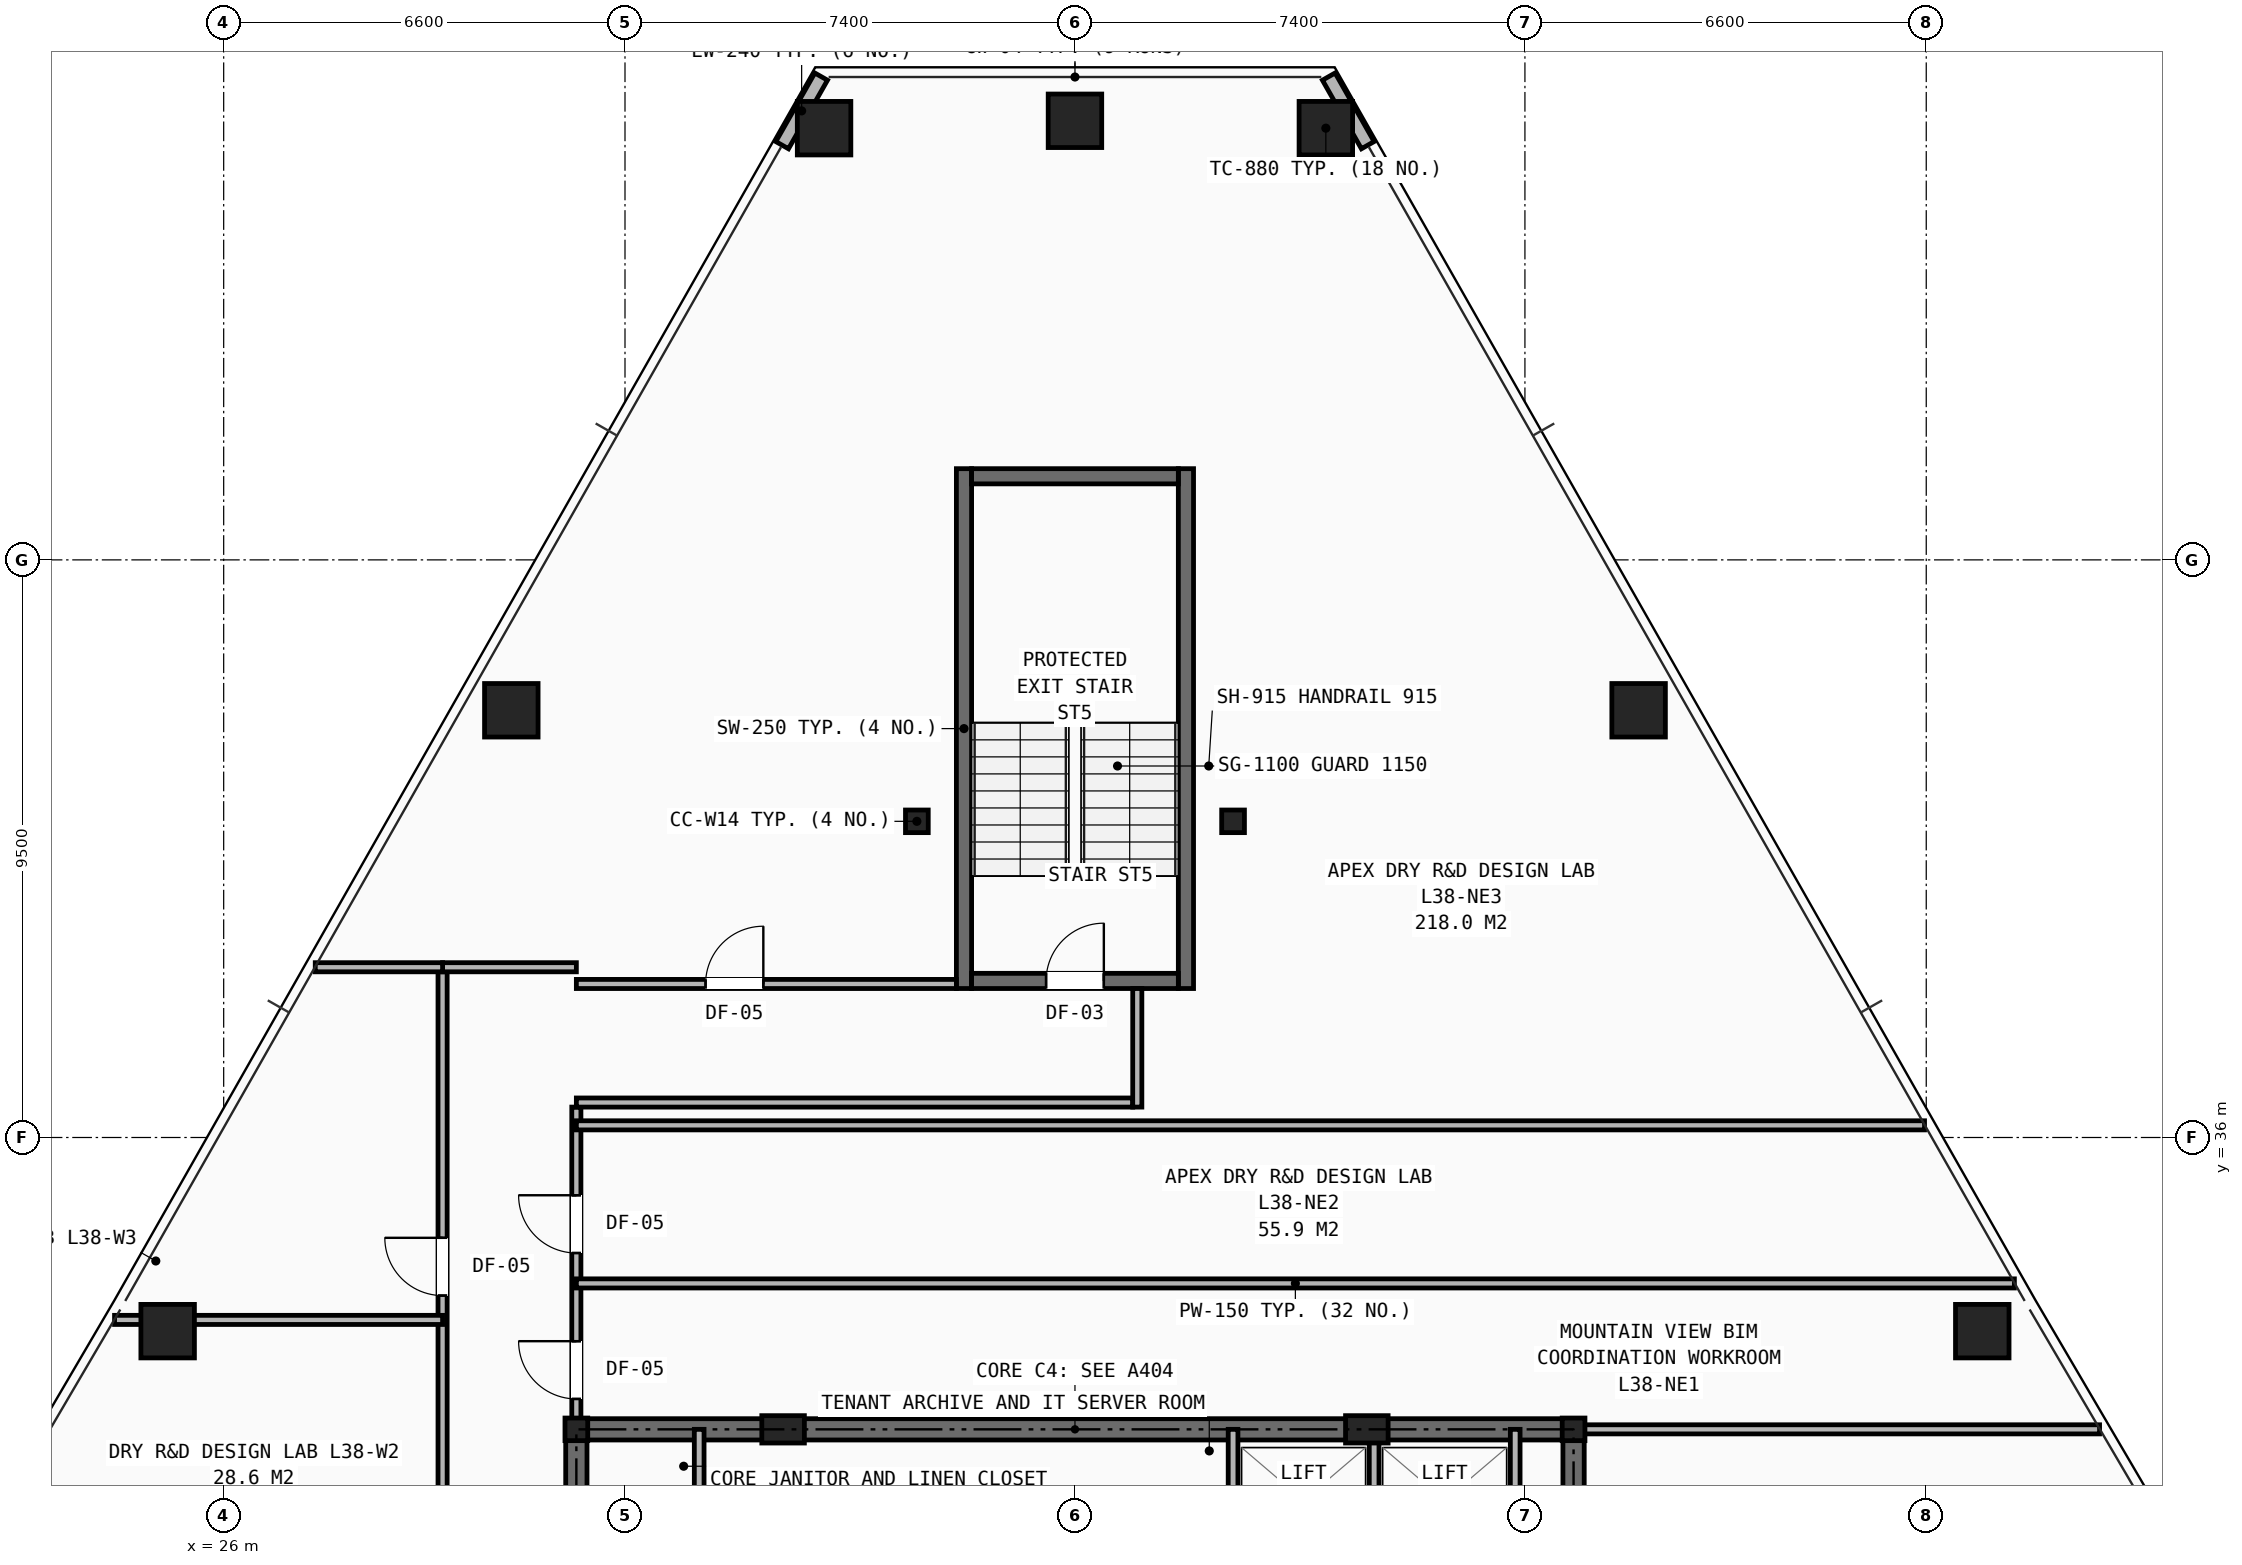
"""IFC4 building model, lengths in metres.
Left out: names, types, materials, properties, quantities, classifications, styles, units other than length and angle.
Written with IfcOpenShell. Run it as: python <this file> out.ifc"""

import sys

from ifc_helpers import new_model, si_unit, direction, frame, frame_2d, origin, origin_2d, place, context, subcontext, project, spatial, rectangle, hollow_rectangle, i_section, extrude, element, fill, save


model = new_model("IFC4")
c1 = context("Model", 3, precision=1e-05, world=origin(), true_north=direction((0.0, 1.0)))
c2 = subcontext(c1, "Body", "Model", "MODEL_VIEW")
j1 = project(units=[si_unit("LENGTHUNIT", "METRE"), si_unit("PLANEANGLEUNIT", "RADIAN")], contexts=[c1])
p1 = place(None, origin())
s1 = spatial("IfcSite", under=j1, at=p1, CompositionType="ELEMENT")
p2 = place(p1, origin())
s2 = spatial("IfcBuilding", under=s1, at=p2, CompositionType="ELEMENT")
p3 = place(p2, frame((0.0, 0.0, 133.25)))
s3 = spatial("IfcBuildingStorey", under=s2, at=p3, CompositionType="ELEMENT", Elevation=133.25)
for number, where, z_axis, x_axis in (
    (1, (31.8, 31.2, 0.0), (0.0, 0.0, 1.0), (1.0, 0.0, 0.0)),
    (2, (48.2, 31.2, 0.0), (0.0, 0.0, 1.0), (1.0, 0.0, 0.0)),
    (3, (37.4, 41.2, 0.0), (0.0, 0.0, 1.0), (1.0, 0.0, 0.0)),
    (4, (42.6, 41.2, 0.0), (0.0, 0.0, 1.0), (1.0, 0.0, 0.0)),
):
    element("IfcColumn", number, at=place(p3, frame(where, z_axis=z_axis, x_axis=x_axis)), inside=s3, PredefinedType="COLUMN", context=c2, shape_type="SweptSolid", body=[
        extrude(i_section(OverallWidth=0.374, OverallDepth=0.372, WebThickness=0.016, FlangeThickness=0.026, at=origin_2d()), origin(), (0.0, 0.0, 1.0), 3.45),
    ])
for number, where, z_axis, x_axis in (
    (5, (35.2, 31.2, 0.0), (0.0, 0.0, 1.0), (1.0, 0.0, 0.0)),
    (6, (44.8, 31.2, 0.0), (0.0, 0.0, 1.0), (1.0, 0.0, 0.0)),
):
    element("IfcColumn", number, at=place(p3, frame(where, z_axis=z_axis, x_axis=x_axis)), inside=s3, PredefinedType="PILASTER", context=c2, shape_type="SweptSolid", body=[
        extrude(rectangle(XDim=0.7, YDim=0.45, at=origin_2d()), origin(), (0.0, 0.0, 1.0), 3.45),
    ])
for number, where, z_axis, x_axis in (
    (7, (44.126, 52.6, 0.0), (0.0, 0.0, 1.0), (1.0, 0.0, 0.0)),
    (8, (40.0, 52.722, 0.0), (0.0, 0.0, 1.0), (1.0, 0.0, 0.0)),
    (9, (35.874, 52.6, 0.0), (0.0, 0.0, 1.0), (1.0, 0.0, 0.0)),
    (10, (30.73, 43.026, 0.0), (0.0, 0.0, 1.0), (1.0, 0.0, 0.0)),
    (11, (25.079, 32.815, 0.0), (0.0, 0.0, 1.0), (1.0, 0.0, 0.0)),
    (12, (54.921, 32.815, 0.0), (0.0, 0.0, 1.0), (1.0, 0.0, 0.0)),
    (13, (49.27, 43.026, 0.0), (0.0, 0.0, 1.0), (1.0, 0.0, 0.0)),
):
    element("IfcColumn", number, at=place(p3, frame(where, z_axis=z_axis, x_axis=x_axis)), inside=s3, PredefinedType="COLUMN", context=c2, shape_type="SweptSolid", body=[
        extrude(hollow_rectangle(XDim=0.88, YDim=0.88, WallThickness=0.06, at=origin_2d()), origin(), (0.0, 0.0, 1.0), 3.45),
    ])
for number, where, z_axis, x_axis in (
    (14, (35.826, 53.449, 0.0), (0.0, 0.0, 1.0), (-0.494, -0.869, 0.0)),
    (15, (44.815, 52.321, 0.0), (0.0, 0.0, 1.0), (-0.494, 0.869, 0.0)),
):
    element("IfcWall", number, at=place(p3, frame(where, z_axis=z_axis, x_axis=x_axis)), inside=s3, PredefinedType="SHEAR", context=c2, shape_type="SweptSolid", body=[
        extrude(rectangle(XDim=1.298, YDim=0.24, at=frame_2d((0.649, 0.0))), origin(), (0.0, 0.0, 1.0), 2.583),
    ])
p4 = place(p3, frame((31.8, 31.2, 0.0), z_axis=(0.0, 0.0, 1.0), x_axis=(1.0, 0.0, 0.0)))
e16 = element("IfcWall", 16, at=p4, inside=s3, PredefinedType="SHEAR", context=c2, shape_type="SweptSolid", body=[
    extrude(rectangle(XDim=16.4, YDim=0.35, at=frame_2d((8.2, 0.0))), origin(), (0.0, 0.0, 1.0), 3.21),
])
p5 = place(p3, frame((31.8, 16.4, 0.0), z_axis=(0.0, 0.0, 1.0), x_axis=(0.0, 1.0, 0.0)))
e17 = element("IfcWall", 17, at=p5, inside=s3, PredefinedType="SHEAR", context=c2, shape_type="SweptSolid", body=[
    extrude(rectangle(XDim=14.8, YDim=0.35, at=frame_2d((7.4, 0.0))), origin(), (0.0, 0.0, 1.0), 3.21),
])
p6 = place(p5, frame((11.0, 0.0, 0.0)))
e18 = element("IfcOpeningElement", 18, at=p6, cuts=e17, PredefinedType="OPENING", context=c2, shape_type="SweptSolid", body=[
    extrude(rectangle(XDim=1.1, YDim=2.15, at=frame_2d((0.55, 1.075))), frame((0.0, 0.185, 0.0), z_axis=(0.0, -1.0, 0.0), x_axis=(1.0, 0.0, 0.0)), (0.0, 0.0, 1.0), 0.37),
])
p7 = place(p3, frame((48.2, 16.4, 0.0), z_axis=(0.0, 0.0, 1.0), x_axis=(0.0, 1.0, 0.0)))
e19 = element("IfcWall", 19, at=p7, inside=s3, PredefinedType="SHEAR", context=c2, shape_type="SweptSolid", body=[
    extrude(rectangle(XDim=14.8, YDim=0.35, at=frame_2d((7.4, 0.0))), origin(), (0.0, 0.0, 1.0), 3.21),
])
p8 = place(p7, frame((11.0, 0.0, 0.0)))
e20 = element("IfcOpeningElement", 20, at=p8, cuts=e19, PredefinedType="OPENING", context=c2, shape_type="SweptSolid", body=[
    extrude(rectangle(XDim=1.1, YDim=2.15, at=frame_2d((0.55, 1.075))), frame((0.0, 0.185, 0.0), z_axis=(0.0, -1.0, 0.0), x_axis=(1.0, 0.0, 0.0)), (0.0, 0.0, 1.0), 0.37),
])
for number, where, z_axis, x_axis in (
    (21, (33.82, 29.02, 0.0), (0.0, 0.0, 1.0), (0.0, 1.0, 0.0)),
    (22, (42.6, 29.02, 0.0), (0.0, 0.0, 1.0), (0.0, 1.0, 0.0)),
    (23, (44.92, 29.02, 0.0), (0.0, 0.0, 1.0), (0.0, 1.0, 0.0)),
    (24, (47.24, 29.02, 0.0), (0.0, 0.0, 1.0), (0.0, 1.0, 0.0)),
):
    element("IfcWall", number, at=place(p3, frame(where, z_axis=z_axis, x_axis=x_axis)), inside=s3, PredefinedType="SOLIDWALL", context=c2, shape_type="SweptSolid", body=[
        extrude(rectangle(XDim=2.18, YDim=0.16, at=frame_2d((1.09, 0.0))), origin(), (0.0, 0.0, 1.0), 2.661),
    ])
p9 = place(p3, frame((29.6, 24.9, 0.0), z_axis=(0.0, 0.0, 1.0), x_axis=(0.0, 1.0, 0.0)))
e25 = element("IfcWall", 25, at=p9, inside=s3, PredefinedType="PARTITIONING", context=c2, shape_type="SweptSolid", body=[
    extrude(rectangle(XDim=13.9, YDim=0.15, at=frame_2d((6.95, 0.0))), origin(), (0.0, 0.0, 1.0), 2.252),
])
p10 = place(p9, frame((0.4, 0.0, 0.0)))
e26 = element("IfcOpeningElement", 26, at=p10, cuts=e25, PredefinedType="OPENING", context=c2, shape_type="SweptSolid", body=[
    extrude(rectangle(XDim=0.95, YDim=2.1, at=frame_2d((0.475, 1.05))), frame((0.0, 0.085, 0.0), z_axis=(0.0, -1.0, 0.0), x_axis=(1.0, 0.0, 0.0)), (0.0, 0.0, 1.0), 0.17),
])
p11 = place(p9, frame((4.0, 0.0, 0.0)))
e27 = element("IfcOpeningElement", 27, at=p11, cuts=e25, PredefinedType="OPENING", context=c2, shape_type="SweptSolid", body=[
    extrude(rectangle(XDim=0.95, YDim=2.1, at=frame_2d((0.475, 1.05))), frame((0.0, 0.085, 0.0), z_axis=(0.0, -1.0, 0.0), x_axis=(1.0, 0.0, 0.0)), (0.0, 0.0, 1.0), 0.17),
])
p12 = place(p9, frame((8.5, 0.0, 0.0)))
e28 = element("IfcOpeningElement", 28, at=p12, cuts=e25, PredefinedType="OPENING", context=c2, shape_type="SweptSolid", body=[
    extrude(rectangle(XDim=0.95, YDim=2.1, at=frame_2d((0.475, 1.05))), frame((0.0, 0.085, 0.0), z_axis=(0.0, -1.0, 0.0), x_axis=(1.0, 0.0, 0.0)), (0.0, 0.0, 1.0), 0.17),
])
p13 = place(p3, frame((31.8, 31.2, 0.0), z_axis=(0.0, 0.0, 1.0), x_axis=(0.0, 1.0, 0.0)))
e29 = element("IfcWall", 29, at=p13, inside=s3, PredefinedType="PARTITIONING", context=c2, shape_type="SweptSolid", body=[
    extrude(rectangle(XDim=5.3, YDim=0.15, at=frame_2d((2.65, 0.0))), origin(), (0.0, 0.0, 1.0), 2.252),
])
p14 = place(p13, frame((0.5, 0.0, 0.0)))
e30 = element("IfcOpeningElement", 30, at=p14, cuts=e29, PredefinedType="OPENING", context=c2, shape_type="SweptSolid", body=[
    extrude(rectangle(XDim=0.95, YDim=2.1, at=frame_2d((0.475, 1.05))), frame((0.0, 0.085, 0.0), z_axis=(0.0, -1.0, 0.0), x_axis=(1.0, 0.0, 0.0)), (0.0, 0.0, 1.0), 0.17),
])
p15 = place(p13, frame((2.9, 0.0, 0.0)))
e31 = element("IfcOpeningElement", 31, at=p15, cuts=e29, PredefinedType="OPENING", context=c2, shape_type="SweptSolid", body=[
    extrude(rectangle(XDim=0.95, YDim=2.1, at=frame_2d((0.475, 1.05))), frame((0.0, 0.085, 0.0), z_axis=(0.0, -1.0, 0.0), x_axis=(1.0, 0.0, 0.0)), (0.0, 0.0, 1.0), 0.17),
])
p16 = place(p3, frame((29.6, 38.8, 0.0), z_axis=(0.0, 0.0, 1.0), x_axis=(1.0, 0.0, 0.0)))
e32 = element("IfcWall", 32, at=p16, inside=s3, PredefinedType="PARTITIONING", context=c2, shape_type="SweptSolid", body=[
    extrude(rectangle(XDim=2.2, YDim=0.15, at=frame_2d((1.1, 0.0))), origin(), (0.0, 0.0, 1.0), 2.743),
])
p17 = place(p3, frame((27.506, 38.8, 0.0), z_axis=(0.0, 0.0, 1.0), x_axis=(1.0, 0.0, 0.0)))
e33 = element("IfcWall", 33, at=p17, inside=s3, PredefinedType="PARTITIONING", context=c2, shape_type="SweptSolid", body=[
    extrude(rectangle(XDim=2.094, YDim=0.15, at=frame_2d((1.047, 0.0))), origin(), (0.0, 0.0, 1.0), 2.589),
])
p18 = place(p3, frame((24.205, 33.0, 0.0), z_axis=(0.0, 0.0, 1.0), x_axis=(1.0, 0.0, 0.0)))
e34 = element("IfcWall", 34, at=p18, inside=s3, PredefinedType="PARTITIONING", context=c2, shape_type="SweptSolid", body=[
    extrude(rectangle(XDim=5.395, YDim=0.15, at=frame_2d((2.697, 0.0))), origin(), (0.0, 0.0, 1.0), 2.252),
])
p19 = place(p3, frame((48.2, 31.2, 0.0), z_axis=(0.0, 0.0, 1.0), x_axis=(1.0, 0.0, 0.0)))
e35 = element("IfcWall", 35, at=p19, inside=s3, PredefinedType="PARTITIONING", context=c2, shape_type="SweptSolid", body=[
    extrude(rectangle(XDim=8.65, YDim=0.15, at=frame_2d((4.325, 0.0))), origin(), (0.0, 0.0, 1.0), 2.252),
])
p20 = place(p3, frame((31.8, 33.6, 0.0), z_axis=(0.0, 0.0, 1.0), x_axis=(1.0, 0.0, 0.0)))
e36 = element("IfcWall", 36, at=p20, inside=s3, PredefinedType="PARTITIONING", context=c2, shape_type="SweptSolid", body=[
    extrude(rectangle(XDim=23.649, YDim=0.15, at=frame_2d((11.825, 0.0))), origin(), (0.0, 0.0, 1.0), 2.589),
])
p21 = place(p3, frame((31.8, 36.2, 0.0), z_axis=(0.0, 0.0, 1.0), x_axis=(1.0, 0.0, 0.0)))
e37 = element("IfcWall", 37, at=p21, inside=s3, PredefinedType="PARTITIONING", context=c2, shape_type="SweptSolid", body=[
    extrude(rectangle(XDim=22.172, YDim=0.15, at=frame_2d((11.086, 0.0))), origin(), (0.0, 0.0, 1.0), 2.589),
])
for number, where, z_axis, x_axis in (
    (38, (38.175, 38.45, 0.0), (0.0, 0.0, 1.0), (0.0, 1.0, 0.0)),
    (39, (41.825, 38.45, 0.0), (0.0, 0.0, 1.0), (0.0, 1.0, 0.0)),
):
    element("IfcWall", number, at=place(p3, frame(where, z_axis=z_axis, x_axis=x_axis)), inside=s3, PredefinedType="SHEAR", context=c2, shape_type="SweptSolid", body=[
        extrude(rectangle(XDim=8.55, YDim=0.25, at=frame_2d((4.275, 0.0))), origin(), (0.0, 0.0, 1.0), 3.21),
    ])
p22 = place(p3, frame((38.3, 38.575, 0.0), z_axis=(0.0, 0.0, 1.0), x_axis=(1.0, 0.0, 0.0)))
e40 = element("IfcWall", 40, at=p22, inside=s3, PredefinedType="SHEAR", context=c2, shape_type="SweptSolid", body=[
    extrude(rectangle(XDim=3.4, YDim=0.25, at=frame_2d((1.7, 0.0))), origin(), (0.0, 0.0, 1.0), 3.21),
])
p23 = place(p22, frame((1.225, 0.0, 0.0)))
e41 = element("IfcOpeningElement", 41, at=p23, cuts=e40, PredefinedType="OPENING", context=c2, shape_type="SweptSolid", body=[
    extrude(rectangle(XDim=0.95, YDim=2.1, at=frame_2d((0.475, 1.05))), frame((0.0, 0.135, 0.0), z_axis=(0.0, -1.0, 0.0), x_axis=(1.0, 0.0, 0.0)), (0.0, 0.0, 1.0), 0.27),
])
p24 = place(p3, frame((38.3, 46.875, 0.0), z_axis=(0.0, 0.0, 1.0), x_axis=(1.0, 0.0, 0.0)))
e42 = element("IfcWall", 42, at=p24, inside=s3, PredefinedType="SHEAR", context=c2, shape_type="SweptSolid", body=[
    extrude(rectangle(XDim=3.4, YDim=0.25, at=frame_2d((1.7, 0.0))), origin(), (0.0, 0.0, 1.0), 3.21),
])
p25 = place(p3, frame((31.8, 36.575, 0.0), z_axis=(0.0, 0.0, 1.0), x_axis=(1.0, 0.0, 0.0)))
e43 = element("IfcWall", 43, at=p25, inside=s3, PredefinedType="PARTITIONING", context=c2, shape_type="SweptSolid", body=[
    extrude(rectangle(XDim=9.15, YDim=0.15, at=frame_2d((4.575, 0.0))), origin(), (0.0, 0.0, 1.0), 3.21),
])
p26 = place(p3, frame((31.8, 38.525, 0.0), z_axis=(0.0, 0.0, 1.0), x_axis=(1.0, 0.0, 0.0)))
e44 = element("IfcWall", 44, at=p26, inside=s3, PredefinedType="PARTITIONING", context=c2, shape_type="SweptSolid", body=[
    extrude(rectangle(XDim=6.25, YDim=0.15, at=frame_2d((3.125, 0.0))), origin(), (0.0, 0.0, 1.0), 2.743),
])
p27 = place(p26, frame((2.125, 0.0, 0.0)))
e45 = element("IfcOpeningElement", 45, at=p27, cuts=e44, PredefinedType="OPENING", context=c2, shape_type="SweptSolid", body=[
    extrude(rectangle(XDim=0.95, YDim=2.1, at=frame_2d((0.475, 1.05))), frame((0.0, 0.085, 0.0), z_axis=(0.0, -1.0, 0.0), x_axis=(1.0, 0.0, 0.0)), (0.0, 0.0, 1.0), 0.17),
])
p28 = place(p3, frame((41.025, 36.5, 0.0), z_axis=(0.0, 0.0, 1.0), x_axis=(0.0, 1.0, 0.0)))
e46 = element("IfcWall", 46, at=p28, inside=s3, PredefinedType="PARTITIONING", context=c2, shape_type="SweptSolid", body=[
    extrude(rectangle(XDim=1.95, YDim=0.15, at=frame_2d((0.975, 0.0))), origin(), (0.0, 0.0, 1.0), 3.21),
])
p29 = place(p12, origin())
e47 = element("IfcDoor", 47, at=p29, inside=s3, OperationType="SINGLE_SWING_RIGHT", PredefinedType="DOOR", context=c2, shape_type="SweptSolid", body=[
    extrude(rectangle(XDim=0.95, YDim=2.1, at=frame_2d((0.475, 1.05))), frame((0.0, 0.025, 0.0), z_axis=(0.0, -1.0, 0.0), x_axis=(1.0, 0.0, 0.0)), (0.0, 0.0, 1.0), 0.05),
])
fill(e28, e47)
p30 = place(p14, origin())
e48 = element("IfcDoor", 48, at=p30, inside=s3, OperationType="SINGLE_SWING_RIGHT", PredefinedType="DOOR", context=c2, shape_type="SweptSolid", body=[
    extrude(rectangle(XDim=0.95, YDim=2.1, at=frame_2d((0.475, 1.05))), frame((0.0, 0.025, 0.0), z_axis=(0.0, -1.0, 0.0), x_axis=(1.0, 0.0, 0.0)), (0.0, 0.0, 1.0), 0.05),
])
fill(e30, e48)
p31 = place(p15, origin())
e49 = element("IfcDoor", 49, at=p31, inside=s3, OperationType="SINGLE_SWING_RIGHT", PredefinedType="DOOR", context=c2, shape_type="SweptSolid", body=[
    extrude(rectangle(XDim=0.95, YDim=2.1, at=frame_2d((0.475, 1.05))), frame((0.0, 0.025, 0.0), z_axis=(0.0, -1.0, 0.0), x_axis=(1.0, 0.0, 0.0)), (0.0, 0.0, 1.0), 0.05),
])
fill(e31, e49)
p32 = place(p27, origin())
e50 = element("IfcDoor", 50, at=p32, inside=s3, OperationType="SINGLE_SWING_RIGHT", PredefinedType="DOOR", context=c2, shape_type="SweptSolid", body=[
    extrude(rectangle(XDim=0.95, YDim=2.1, at=frame_2d((0.475, 1.05))), frame((0.0, 0.025, 0.0), z_axis=(0.0, -1.0, 0.0), x_axis=(1.0, 0.0, 0.0)), (0.0, 0.0, 1.0), 0.05),
])
fill(e45, e50)
p33 = place(p23, origin())
e51 = element("IfcDoor", 51, at=p33, inside=s3, OperationType="SINGLE_SWING_RIGHT", PredefinedType="DOOR", context=c2, shape_type="SweptSolid", body=[
    extrude(rectangle(XDim=0.95, YDim=2.1, at=frame_2d((0.475, 1.05))), frame((0.0, 0.025, 0.0), z_axis=(0.0, -1.0, 0.0), x_axis=(1.0, 0.0, 0.0)), (0.0, 0.0, 1.0), 0.05),
])
fill(e41, e51)
save(model, sys.argv[1])
